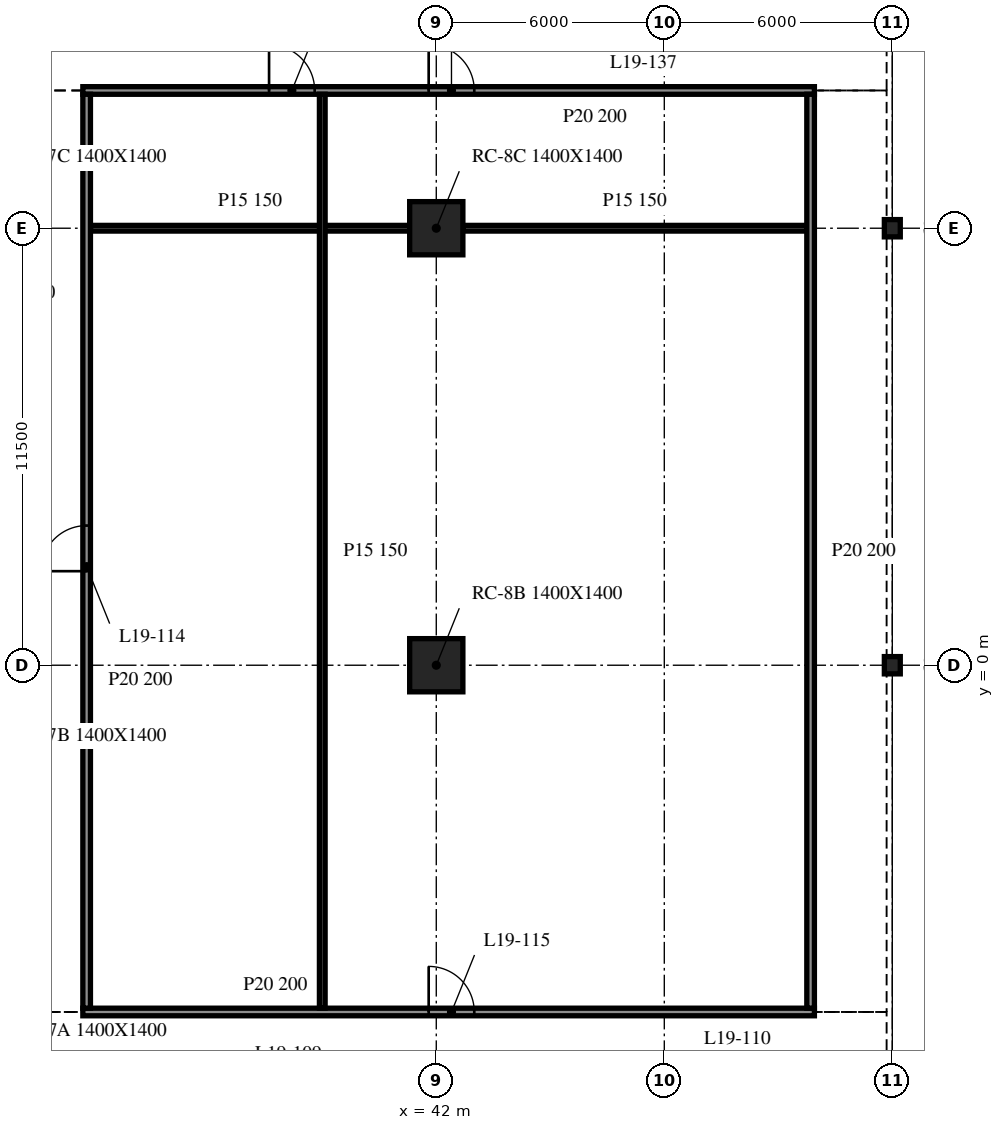
"""IFC4 building model, lengths in metres.
Left out: names, types, materials, properties, quantities, classifications, styles, units other than length and angle.
Written with IfcOpenShell. Run it as: python <this file> out.ifc"""

import sys

from ifc_helpers import new_model, si_unit, direction, frame, frame_2d, origin, origin_2d, place, context, subcontext, project, spatial, rectangle, i_section, extrude, element, fill, save


model = new_model("IFC4")
c1 = context("Model", 3, precision=1e-05, world=origin(), true_north=direction((0.0, 1.0)))
c2 = subcontext(c1, "Body", "Model", "MODEL_VIEW")
j1 = project(units=[si_unit("LENGTHUNIT", "METRE"), si_unit("PLANEANGLEUNIT", "RADIAN")], contexts=[c1])
p1 = place(None, origin())
s1 = spatial("IfcSite", under=j1, at=p1, CompositionType="ELEMENT")
p2 = place(p1, origin())
s2 = spatial("IfcBuilding", under=s1, at=p2, CompositionType="ELEMENT")
p3 = place(p2, frame((0.0, 0.0, 84.8)))
s3 = spatial("IfcBuildingStorey", under=s2, at=p3, CompositionType="ELEMENT", Elevation=84.8)
for number, where, z_axis, x_axis in (
    (1, (42.0, 0.0, -0.34), (0.0, 0.0, 1.0), (1.0, 0.0, 0.0)),
    (2, (42.0, 11.5, -0.34), (0.0, 0.0, 1.0), (1.0, 0.0, 0.0)),
):
    element("IfcColumn", number, at=place(p3, frame(where, z_axis=z_axis, x_axis=x_axis)), inside=s3, PredefinedType="COLUMN", context=c2, shape_type="SweptSolid", body=[
        extrude(rectangle(XDim=1.4, YDim=1.4, at=origin_2d()), origin(), (0.0, 0.0, 1.0), 4.1),
    ])
for number, where, z_axis, x_axis in (
    (3, (54.0, 0.0, -0.34), (0.0, 0.0, 1.0), (1.0, 0.0, 0.0)),
    (4, (54.0, 11.5, -0.34), (0.0, 0.0, 1.0), (1.0, 0.0, 0.0)),
):
    element("IfcColumn", number, at=place(p3, frame(where, z_axis=z_axis, x_axis=x_axis)), inside=s3, PredefinedType="COLUMN", context=c2, shape_type="SweptSolid", body=[
        extrude(i_section(OverallWidth=0.419, OverallDepth=0.455, WebThickness=0.042, FlangeThickness=0.068, at=origin_2d()), origin(), (0.0, 0.0, 1.0), 4.1),
    ])
p4 = place(p3, frame((32.7, -9.125, 0.0), z_axis=(0.0, 0.0, 1.0), x_axis=(1.0, 0.0, 0.0)))
e5 = element("IfcWall", 5, at=p4, inside=s3, PredefinedType="PARTITIONING", context=c2, shape_type="SweptSolid", body=[
    extrude(rectangle(XDim=19.25, YDim=0.2, at=frame_2d((9.625, 0.0))), origin(), (0.0, 0.0, 1.0), 3.76),
])
p5 = place(p4, frame((9.1, 0.0, 0.0)))
e6 = element("IfcOpeningElement", 6, at=p5, cuts=e5, PredefinedType="OPENING", context=c2, shape_type="SweptSolid", body=[
    extrude(rectangle(XDim=1.2, YDim=2.1, at=frame_2d((0.6, 1.05))), frame((0.0, 0.11, 0.0), z_axis=(0.0, -1.0, 0.0), x_axis=(1.0, 0.0, 0.0)), (0.0, 0.0, 1.0), 0.22),
])
p6 = place(p3, frame((32.9, 11.5, 0.0), z_axis=(0.0, 0.0, 1.0), x_axis=(1.0, 0.0, 0.0)))
e7 = element("IfcWall", 7, at=p6, inside=s3, PredefinedType="PARTITIONING", context=c2, shape_type="SweptSolid", body=[
    extrude(rectangle(XDim=8.4, YDim=0.15, at=frame_2d((4.2, 0.0))), origin(), (0.0, 0.0, 1.0), 3.76),
])
p7 = place(p3, frame((42.7, 11.5, 0.0), z_axis=(0.0, 0.0, 1.0), x_axis=(1.0, 0.0, 0.0)))
e8 = element("IfcWall", 8, at=p7, inside=s3, PredefinedType="PARTITIONING", context=c2, shape_type="SweptSolid", body=[
    extrude(rectangle(XDim=9.05, YDim=0.15, at=frame_2d((4.525, 0.0))), origin(), (0.0, 0.0, 1.0), 3.76),
])
p8 = place(p3, frame((32.7, 15.125, 0.0), z_axis=(0.0, 0.0, 1.0), x_axis=(1.0, 0.0, 0.0)))
e9 = element("IfcWall", 9, at=p8, inside=s3, PredefinedType="PARTITIONING", context=c2, shape_type="SweptSolid", body=[
    extrude(rectangle(XDim=19.25, YDim=0.2, at=frame_2d((9.625, 0.0))), origin(), (0.0, 0.0, 1.0), 3.76),
])
p9 = place(p8, frame((4.9, 0.0, 0.0)))
e10 = element("IfcOpeningElement", 10, at=p9, cuts=e9, PredefinedType="OPENING", context=c2, shape_type="SweptSolid", body=[
    extrude(rectangle(XDim=1.2, YDim=2.1, at=frame_2d((0.6, 1.05))), frame((0.0, 0.11, 0.0), z_axis=(0.0, -1.0, 0.0), x_axis=(1.0, 0.0, 0.0)), (0.0, 0.0, 1.0), 0.22),
])
p10 = place(p8, frame((9.1, 0.0, 0.0)))
e11 = element("IfcOpeningElement", 11, at=p10, cuts=e9, PredefinedType="OPENING", context=c2, shape_type="SweptSolid", body=[
    extrude(rectangle(XDim=1.2, YDim=2.1, at=frame_2d((0.6, 1.05))), frame((0.0, 0.11, 0.0), z_axis=(0.0, -1.0, 0.0), x_axis=(1.0, 0.0, 0.0)), (0.0, 0.0, 1.0), 0.22),
])
p11 = place(p3, frame((32.8, -9.025, 0.0), z_axis=(0.0, 0.0, 1.0), x_axis=(0.0, 1.0, 0.0)))
e12 = element("IfcWall", 12, at=p11, inside=s3, PredefinedType="PARTITIONING", context=c2, shape_type="SweptSolid", body=[
    extrude(rectangle(XDim=24.05, YDim=0.2, at=frame_2d((12.025, 0.0))), origin(), (0.0, 0.0, 1.0), 3.76),
])
p12 = place(p11, frame((11.5, 0.0, 0.0)))
e13 = element("IfcOpeningElement", 13, at=p12, cuts=e12, PredefinedType="OPENING", context=c2, shape_type="SweptSolid", body=[
    extrude(rectangle(XDim=1.2, YDim=2.1, at=frame_2d((0.6, 1.05))), frame((0.0, 0.11, 0.0), z_axis=(0.0, -1.0, 0.0), x_axis=(1.0, 0.0, 0.0)), (0.0, 0.0, 1.0), 0.22),
])
p13 = place(p3, frame((39.0, -9.025, 0.0), z_axis=(0.0, 0.0, 1.0), x_axis=(0.0, 1.0, 0.0)))
e14 = element("IfcWall", 14, at=p13, inside=s3, PredefinedType="PARTITIONING", context=c2, shape_type="SweptSolid", body=[
    extrude(rectangle(XDim=24.05, YDim=0.15, at=frame_2d((12.025, 0.0))), origin(), (0.0, 0.0, 1.0), 3.76),
])
p14 = place(p3, frame((51.85, -9.025, 0.0), z_axis=(0.0, 0.0, 1.0), x_axis=(0.0, 1.0, 0.0)))
e15 = element("IfcWall", 15, at=p14, inside=s3, PredefinedType="PARTITIONING", context=c2, shape_type="SweptSolid", body=[
    extrude(rectangle(XDim=24.05, YDim=0.2, at=frame_2d((12.025, 0.0))), origin(), (0.0, 0.0, 1.0), 3.76),
])
p15 = place(p12, origin())
e16 = element("IfcDoor", 16, at=p15, inside=s3, OperationType="SINGLE_SWING_LEFT", PredefinedType="DOOR", context=c2, shape_type="SweptSolid", body=[
    extrude(rectangle(XDim=1.2, YDim=2.1, at=frame_2d((0.6, 1.05))), frame((0.0, 0.025, 0.0), z_axis=(0.0, -1.0, 0.0), x_axis=(1.0, 0.0, 0.0)), (0.0, 0.0, 1.0), 0.05),
])
fill(e13, e16)
p16 = place(p5, origin())
e17 = element("IfcDoor", 17, at=p16, inside=s3, OperationType="SINGLE_SWING_RIGHT", PredefinedType="DOOR", context=c2, shape_type="SweptSolid", body=[
    extrude(rectangle(XDim=1.2, YDim=2.1, at=frame_2d((0.6, 1.05))), frame((0.0, 0.025, 0.0), z_axis=(0.0, -1.0, 0.0), x_axis=(1.0, 0.0, 0.0)), (0.0, 0.0, 1.0), 0.05),
])
fill(e6, e17)
p17 = place(p9, origin())
e18 = element("IfcDoor", 18, at=p17, inside=s3, OperationType="SINGLE_SWING_RIGHT", PredefinedType="DOOR", context=c2, shape_type="SweptSolid", body=[
    extrude(rectangle(XDim=1.2, YDim=2.1, at=frame_2d((0.6, 1.05))), frame((0.0, 0.025, 0.0), z_axis=(0.0, -1.0, 0.0), x_axis=(1.0, 0.0, 0.0)), (0.0, 0.0, 1.0), 0.05),
])
fill(e10, e18)
p18 = place(p10, origin())
e19 = element("IfcDoor", 19, at=p18, inside=s3, OperationType="SINGLE_SWING_LEFT", PredefinedType="DOOR", context=c2, shape_type="SweptSolid", body=[
    extrude(rectangle(XDim=1.2, YDim=2.1, at=frame_2d((0.6, 1.05))), frame((0.0, 0.025, 0.0), z_axis=(0.0, -1.0, 0.0), x_axis=(1.0, 0.0, 0.0)), (0.0, 0.0, 1.0), 0.05),
])
fill(e11, e19)
save(model, sys.argv[1])
